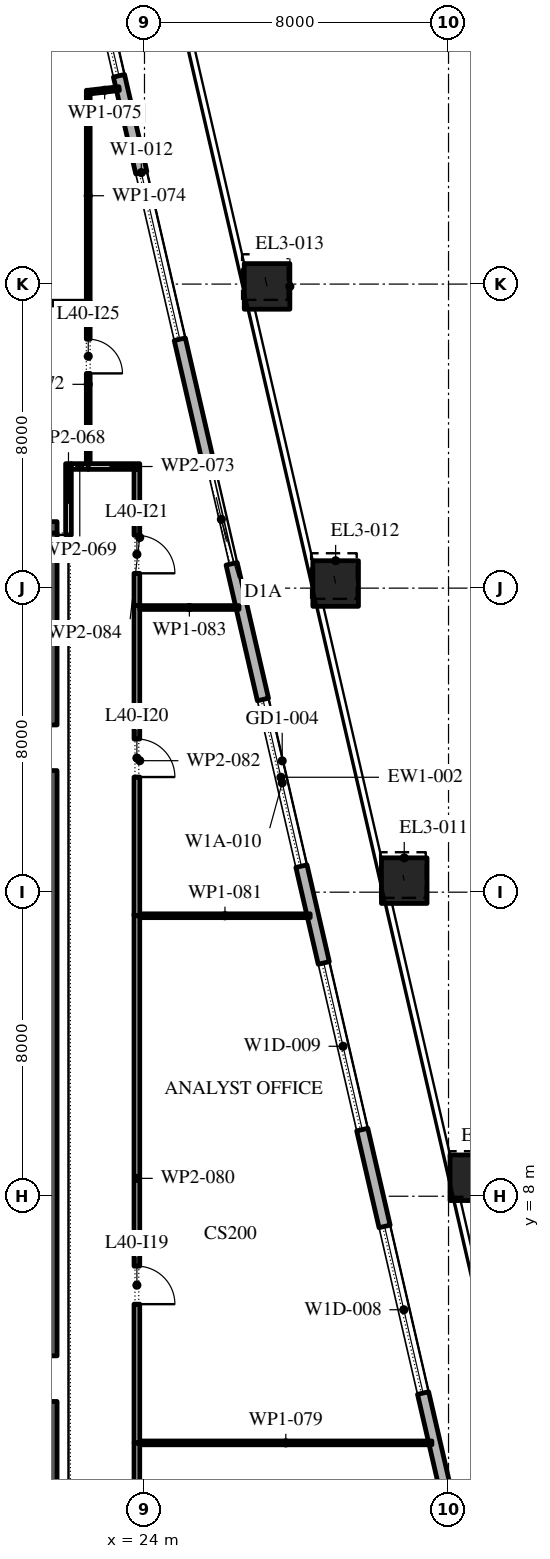
"""IFC4 building model, lengths in metres.
Left out: names, types, materials, properties, quantities, classifications, styles, units other than length and angle.
Written with IfcOpenShell. Run it as: python <this file> out.ifc"""

import sys

from ifc_helpers import new_model, si_unit, direction, frame, frame_2d, origin, origin_2d, place, context, subcontext, project, spatial, rectangle, extrude, element, fill, save


model = new_model("IFC4")
c1 = context("Model", 3, precision=1e-05, world=origin(), true_north=direction((0.0, 1.0)))
c2 = subcontext(c1, "Body", "Model", "MODEL_VIEW")
j1 = project(units=[si_unit("LENGTHUNIT", "METRE"), si_unit("PLANEANGLEUNIT", "RADIAN")], contexts=[c1])
p1 = place(None, origin())
s1 = spatial("IfcSite", under=j1, at=p1, CompositionType="ELEMENT")
p2 = place(p1, origin())
s2 = spatial("IfcBuilding", under=s1, at=p2, CompositionType="ELEMENT")
p3 = place(p2, frame((0.0, 0.0, 184.2)))
s3 = spatial("IfcBuildingStorey", under=s2, at=p3, CompositionType="ELEMENT", Elevation=184.2)
p4 = place(p3, frame((32.639, 8.486, 0.0), z_axis=(-0.005404479485, 0.023361298418, 0.999712479335), x_axis=(-0.974268511785, -0.225390476607, 0.0)))
e1 = element("IfcColumn", 1, at=p4, inside=s3, PredefinedType="COLUMN", context=c2, shape_type="SweptSolid", body=[
    extrude(rectangle(XDim=1.2, YDim=1.2, at=origin_2d()), origin(), (0.0, 0.0, 1.0), 4.201),
])
p5 = place(p3, frame((30.835, 16.304, 0.0), z_axis=(-0.008132851642, 0.035029353857, 0.999353191366), x_axis=(-0.974090845759, -0.226157078617, 0.0)))
e2 = element("IfcColumn", 2, at=p5, inside=s3, PredefinedType="COLUMN", context=c2, shape_type="SweptSolid", body=[
    extrude(rectangle(XDim=1.2, YDim=1.2, at=origin_2d()), origin(), (0.0, 0.0, 1.0), 4.203),
])
p6 = place(p3, frame((29.03, 24.121, 0.0), z_axis=(-0.010799619665, 0.046740289408, 0.998848694028), x_axis=(-0.974329962248, -0.225124686929, 0.0)))
e3 = element("IfcColumn", 3, at=p6, inside=s3, PredefinedType="COLUMN", context=c2, shape_type="SweptSolid", body=[
    extrude(rectangle(XDim=1.2, YDim=1.2, at=origin_2d()), origin(), (0.0, 0.0, 1.0), 4.205),
])
p7 = place(p3, frame((27.225, 31.939, 0.0), z_axis=(-0.013519814281, 0.05837310372, 0.998203283597), x_axis=(-0.974211350104, -0.225637420054, 0.0)))
e4 = element("IfcColumn", 4, at=p7, inside=s3, PredefinedType="COLUMN", context=c2, shape_type="SweptSolid", body=[
    extrude(rectangle(XDim=1.2, YDim=1.2, at=origin_2d()), origin(), (0.0, 0.0, 1.0), 4.208),
])
p8 = place(p3, frame((33.157, -5.092, 0.0), z_axis=(0.0, 0.0, 1.0), x_axis=(-0.224950279389, 0.974370243697, 0.0)))
e5 = element("IfcWall", 5, at=p8, inside=s3, PredefinedType="STANDARD", context=c2, shape_type="SweptSolid", body=[
    extrude(rectangle(XDim=49.5, YDim=0.3, at=frame_2d((24.75, 0.0))), origin(), (0.0, 0.0, 1.0), 4.0),
])
p9 = place(p8, frame((2.207, 0.0, 0.0)))
e6 = element("IfcOpeningElement", 6, at=p9, cuts=e5, PredefinedType="OPENING", context=c2, shape_type="SweptSolid", body=[
    extrude(rectangle(XDim=2.4, YDim=3.125, at=frame_2d((1.2, 1.562))), frame((0.0, 0.16, 0.0), z_axis=(0.0, -1.0, 0.0), x_axis=(1.0, 0.0, 0.0)), (0.0, 0.0, 1.0), 0.32),
])
p10 = place(p8, frame((8.121, 0.0, 0.45)))
e7 = element("IfcOpeningElement", 7, at=p10, cuts=e5, PredefinedType="OPENING", context=c2, shape_type="SweptSolid", body=[
    extrude(rectangle(XDim=4.5, YDim=2.875, at=frame_2d((2.25, 1.438))), frame((0.0, 0.16, 0.0), z_axis=(0.0, -1.0, 0.0), x_axis=(1.0, 0.0, 0.0)), (0.0, 0.0, 1.0), 0.32),
])
p11 = place(p8, frame((15.236, 0.0, 0.45)))
e8 = element("IfcOpeningElement", 8, at=p11, cuts=e5, PredefinedType="OPENING", context=c2, shape_type="SweptSolid", body=[
    extrude(rectangle(XDim=4.5, YDim=2.875, at=frame_2d((2.25, 1.438))), frame((0.0, 0.16, 0.0), z_axis=(0.0, -1.0, 0.0), x_axis=(1.0, 0.0, 0.0)), (0.0, 0.0, 1.0), 0.32),
])
p12 = place(p8, frame((22.35, 0.0, 0.45)))
e9 = element("IfcOpeningElement", 9, at=p12, cuts=e5, PredefinedType="OPENING", context=c2, shape_type="SweptSolid", body=[
    extrude(rectangle(XDim=4.5, YDim=3.0, at=frame_2d((2.25, 1.5))), frame((0.0, 0.16, 0.0), z_axis=(0.0, -1.0, 0.0), x_axis=(1.0, 0.0, 0.0)), (0.0, 0.0, 1.0), 0.32),
])
p13 = place(p8, frame((30.514, 0.0, 0.0)))
e10 = element("IfcOpeningElement", 10, at=p13, cuts=e5, PredefinedType="OPENING", context=c2, shape_type="SweptSolid", body=[
    extrude(rectangle(XDim=2.4, YDim=3.45, at=frame_2d((1.2, 1.725))), frame((0.0, 0.16, 0.0), z_axis=(0.0, -1.0, 0.0), x_axis=(1.0, 0.0, 0.0)), (0.0, 0.0, 1.0), 0.32),
])
p14 = place(p8, frame((36.579, 0.0, 0.45)))
e11 = element("IfcOpeningElement", 11, at=p14, cuts=e5, PredefinedType="OPENING", context=c2, shape_type="SweptSolid", body=[
    extrude(rectangle(XDim=4.5, YDim=3.05, at=frame_2d((2.25, 1.525))), frame((0.0, 0.16, 0.0), z_axis=(0.0, -1.0, 0.0), x_axis=(1.0, 0.0, 0.0)), (0.0, 0.0, 1.0), 0.32),
])
p15 = place(p8, frame((43.693, 0.0, 0.45)))
e12 = element("IfcOpeningElement", 12, at=p15, cuts=e5, PredefinedType="OPENING", context=c2, shape_type="SweptSolid", body=[
    extrude(rectangle(XDim=4.5, YDim=3.05, at=frame_2d((2.25, 1.525))), frame((0.0, 0.16, 0.0), z_axis=(0.0, -1.0, 0.0), x_axis=(1.0, 0.0, 0.0)), (0.0, 0.0, 1.0), 0.32),
])
p16 = place(p3, frame((21.35, -2.45, 0.0), z_axis=(0.0, 0.0, 1.0), x_axis=(0.0, 1.0, 0.0)))
e13 = element("IfcWall", 13, at=p16, inside=s3, PredefinedType="SHEAR", context=c2, shape_type="SweptSolid", body=[
    extrude(rectangle(XDim=27.9, YDim=0.7, at=frame_2d((13.95, 0.0))), origin(), (0.0, 0.0, 1.0), 4.0),
])
p17 = place(p16, frame((5.05, 0.0, 0.0)))
e14 = element("IfcOpeningElement", 14, at=p17, cuts=e13, PredefinedType="OPENING", context=c2, shape_type="SweptSolid", body=[
    extrude(rectangle(XDim=1.2, YDim=2.1, at=frame_2d((0.6, 1.05))), frame((0.0, 0.36, 0.0), z_axis=(0.0, -1.0, 0.0), x_axis=(1.0, 0.0, 0.0)), (0.0, 0.0, 1.0), 0.72),
])
p18 = place(p16, frame((21.65, 0.0, 0.0)))
e15 = element("IfcOpeningElement", 15, at=p18, cuts=e13, PredefinedType="OPENING", context=c2, shape_type="SweptSolid", body=[
    extrude(rectangle(XDim=1.2, YDim=2.1, at=frame_2d((0.6, 1.05))), frame((0.0, 0.36, 0.0), z_axis=(0.0, -1.0, 0.0), x_axis=(1.0, 0.0, 0.0)), (0.0, 0.0, 1.0), 0.72),
])
p19 = place(p3, frame((10.3, 25.6, 0.0), z_axis=(0.0, 0.0, 1.0), x_axis=(1.0, 0.0, 0.0)))
e16 = element("IfcWall", 16, at=p19, inside=s3, PredefinedType="SHEAR", context=c2, shape_type="SweptSolid", body=[
    extrude(rectangle(XDim=11.4, YDim=0.3, at=frame_2d((5.7, 0.0))), origin(), (0.0, 0.0, 1.0), 4.0),
])
p20 = place(p3, frame((14.43, 31.5, 0.0), z_axis=(0.0, 0.0, 1.0), x_axis=(1.0, 0.0, 0.0)))
e17 = element("IfcWall", 17, at=p20, inside=s3, PredefinedType="PARTITIONING", context=c2, shape_type="SweptSolid", body=[
    extrude(rectangle(XDim=8.14, YDim=0.1, at=frame_2d((4.07, 0.0))), origin(), (0.0, 0.0, 1.0), 4.0),
])
p21 = place(p3, frame((22.0, 25.4, 0.0), z_axis=(0.0, 0.0, 1.0), x_axis=(0.0, 1.0, 0.0)))
e18 = element("IfcWall", 18, at=p21, inside=s3, PredefinedType="PARTITIONING", context=c2, shape_type="SweptSolid", body=[
    extrude(rectangle(XDim=1.875, YDim=0.15, at=frame_2d((0.938, 0.0))), origin(), (0.0, 0.0, 1.0), 4.0),
])
p22 = place(p3, frame((22.075, 27.2, 0.0), z_axis=(0.0, 0.0, 1.0), x_axis=(1.0, 0.0, 0.0)))
e19 = element("IfcWall", 19, at=p22, inside=s3, PredefinedType="PARTITIONING", context=c2, shape_type="SweptSolid", body=[
    extrude(rectangle(XDim=0.445, YDim=0.15, at=frame_2d((0.223, 0.0))), origin(), (0.0, 0.0, 1.0), 4.0),
])
p23 = place(p3, frame((22.52, 27.275, 0.0), z_axis=(0.0, 0.0, 1.0), x_axis=(0.0, 1.0, 0.0)))
e20 = element("IfcWall", 20, at=p23, inside=s3, PredefinedType="PARTITIONING", context=c2, shape_type="SweptSolid", body=[
    extrude(rectangle(XDim=4.175, YDim=0.1, at=frame_2d((2.087, 0.0))), origin(), (0.0, 0.0, 1.0), 4.0),
])
p24 = place(p23, frame((2.375, 0.0, 0.0)))
e21 = element("IfcOpeningElement", 21, at=p24, cuts=e20, PredefinedType="OPENING", context=c2, shape_type="SweptSolid", body=[
    extrude(rectangle(XDim=0.9, YDim=2.1, at=frame_2d((0.45, 1.05))), frame((0.0, 0.06, 0.0), z_axis=(0.0, -1.0, 0.0), x_axis=(1.0, 0.0, 0.0)), (0.0, 0.0, 1.0), 0.12),
])
p25 = place(p3, frame((22.52, 27.2, 0.0), z_axis=(0.0, 0.0, 1.0), x_axis=(1.0, 0.0, 0.0)))
e22 = element("IfcWall", 22, at=p25, inside=s3, PredefinedType="PARTITIONING", context=c2, shape_type="SweptSolid", body=[
    extrude(rectangle(XDim=1.355, YDim=0.15, at=frame_2d((0.677, 0.0))), origin(), (0.0, 0.0, 1.0), 4.0),
])
p26 = place(p3, frame((22.52, 31.55, 0.0), z_axis=(0.0, 0.0, 1.0), x_axis=(0.0, 1.0, 0.0)))
e23 = element("IfcWall", 23, at=p26, inside=s3, PredefinedType="PARTITIONING", context=c2, shape_type="SweptSolid", body=[
    extrude(rectangle(XDim=5.55, YDim=0.1, at=frame_2d((2.775, 0.0))), origin(), (0.0, 0.0, 1.0), 4.0),
])
p27 = place(p3, frame((22.57, 37.056, 0.0), z_axis=(0.0, 0.0, 1.0), x_axis=(0.993410326243, 0.114612057454, 0.0)))
e24 = element("IfcWall", 24, at=p27, inside=s3, PredefinedType="PARTITIONING", context=c2, shape_type="SweptSolid", body=[
    extrude(rectangle(XDim=0.769, YDim=0.1, at=frame_2d((0.385, 0.0))), origin(), (0.0, 0.0, 1.0), 4.0),
])
p28 = place(p3, frame((23.8, 1.51, 0.0), z_axis=(0.0, 0.0, 1.0), x_axis=(0.0, -1.0, 0.0)))
e25 = element("IfcWall", 25, at=p28, inside=s3, PredefinedType="PARTITIONING", context=c2, shape_type="SweptSolid", body=[
    extrude(rectangle(XDim=6.435, YDim=0.15, at=frame_2d((3.218, 0.0))), origin(), (0.0, 0.0, 1.0), 4.0),
])
p29 = place(p28, frame((2.11, 0.0, 0.0)))
e26 = element("IfcOpeningElement", 26, at=p29, cuts=e25, PredefinedType="OPENING", context=c2, shape_type="SweptSolid", body=[
    extrude(rectangle(XDim=1.0, YDim=2.1, at=frame_2d((0.5, 1.05))), frame((0.0, 0.085, 0.0), z_axis=(0.0, -1.0, 0.0), x_axis=(1.0, 0.0, 0.0)), (0.0, 0.0, 1.0), 0.17),
])
p30 = place(p3, frame((23.875, 1.51, 0.0), z_axis=(0.0, 0.0, 1.0), x_axis=(1.0, 0.0, 0.0)))
e27 = element("IfcWall", 27, at=p30, inside=s3, PredefinedType="PARTITIONING", context=c2, shape_type="SweptSolid", body=[
    extrude(rectangle(XDim=7.687, YDim=0.1, at=frame_2d((3.844, 0.0))), origin(), (0.0, 0.0, 1.0), 4.0),
])
p31 = place(p3, frame((23.8, 15.43, 0.0), z_axis=(0.0, 0.0, 1.0), x_axis=(0.0, -1.0, 0.0)))
e28 = element("IfcWall", 28, at=p31, inside=s3, PredefinedType="PARTITIONING", context=c2, shape_type="SweptSolid", body=[
    extrude(rectangle(XDim=13.92, YDim=0.15, at=frame_2d((6.96, 0.0))), origin(), (0.0, 0.0, 1.0), 4.0),
])
p32 = place(p31, frame((9.27, 0.0, 0.0)))
e29 = element("IfcOpeningElement", 29, at=p32, cuts=e28, PredefinedType="OPENING", context=c2, shape_type="SweptSolid", body=[
    extrude(rectangle(XDim=1.0, YDim=2.1, at=frame_2d((0.5, 1.05))), frame((0.0, 0.085, 0.0), z_axis=(0.0, -1.0, 0.0), x_axis=(1.0, 0.0, 0.0)), (0.0, 0.0, 1.0), 0.17),
])
p33 = place(p3, frame((23.875, 15.38, 0.0), z_axis=(0.0, 0.0, 1.0), x_axis=(1.0, 0.0, 0.0)))
e30 = element("IfcWall", 30, at=p33, inside=s3, PredefinedType="PARTITIONING", context=c2, shape_type="SweptSolid", body=[
    extrude(rectangle(XDim=4.485, YDim=0.1, at=frame_2d((2.243, 0.0))), origin(), (0.0, 0.0, 1.0), 4.0),
])
p34 = place(p3, frame((23.8, 23.54, 0.0), z_axis=(0.0, 0.0, 1.0), x_axis=(0.0, -1.0, 0.0)))
e31 = element("IfcWall", 31, at=p34, inside=s3, PredefinedType="PARTITIONING", context=c2, shape_type="SweptSolid", body=[
    extrude(rectangle(XDim=8.16, YDim=0.15, at=frame_2d((4.08, 0.0))), origin(), (0.0, 0.0, 1.0), 4.0),
])
p35 = place(p34, frame((3.51, 0.0, 0.0)))
e32 = element("IfcOpeningElement", 32, at=p35, cuts=e31, PredefinedType="OPENING", context=c2, shape_type="SweptSolid", body=[
    extrude(rectangle(XDim=1.0, YDim=2.1, at=frame_2d((0.5, 1.05))), frame((0.0, 0.085, 0.0), z_axis=(0.0, -1.0, 0.0), x_axis=(1.0, 0.0, 0.0)), (0.0, 0.0, 1.0), 0.17),
])
p36 = place(p3, frame((23.875, 23.49, 0.0), z_axis=(0.0, 0.0, 1.0), x_axis=(1.0, 0.0, 0.0)))
e33 = element("IfcWall", 33, at=p36, inside=s3, PredefinedType="PARTITIONING", context=c2, shape_type="SweptSolid", body=[
    extrude(rectangle(XDim=2.612, YDim=0.1, at=frame_2d((1.306, 0.0))), origin(), (0.0, 0.0, 1.0), 4.0),
])
p37 = place(p3, frame((23.8, 27.125, 0.0), z_axis=(0.0, 0.0, 1.0), x_axis=(0.0, -1.0, 0.0)))
e34 = element("IfcWall", 34, at=p37, inside=s3, PredefinedType="PARTITIONING", context=c2, shape_type="SweptSolid", body=[
    extrude(rectangle(XDim=3.585, YDim=0.15, at=frame_2d((1.792, 0.0))), origin(), (0.0, 0.0, 1.0), 4.0),
])
p38 = place(p37, frame((1.735, 0.0, 0.0)))
e35 = element("IfcOpeningElement", 35, at=p38, cuts=e34, PredefinedType="OPENING", context=c2, shape_type="SweptSolid", body=[
    extrude(rectangle(XDim=1.0, YDim=2.1, at=frame_2d((0.5, 1.05))), frame((0.0, 0.085, 0.0), z_axis=(0.0, -1.0, 0.0), x_axis=(1.0, 0.0, 0.0)), (0.0, 0.0, 1.0), 0.17),
])
p39 = place(p10, origin())
e36 = element("IfcWindow", 36, at=p39, inside=s3, PartitioningType="DOUBLE_PANEL_VERTICAL", PredefinedType="WINDOW", context=c2, shape_type="SweptSolid", body=[
    extrude(rectangle(XDim=4.5, YDim=2.875, at=frame_2d((2.25, 1.438))), frame((0.0, 0.03, 0.0), z_axis=(0.0, -1.0, 0.0), x_axis=(1.0, 0.0, 0.0)), (0.0, 0.0, 1.0), 0.06),
])
fill(e7, e36)
p40 = place(p11, origin())
e37 = element("IfcWindow", 37, at=p40, inside=s3, PartitioningType="DOUBLE_PANEL_VERTICAL", PredefinedType="WINDOW", context=c2, shape_type="SweptSolid", body=[
    extrude(rectangle(XDim=4.5, YDim=2.875, at=frame_2d((2.25, 1.438))), frame((0.0, 0.03, 0.0), z_axis=(0.0, -1.0, 0.0), x_axis=(1.0, 0.0, 0.0)), (0.0, 0.0, 1.0), 0.06),
])
fill(e8, e37)
p41 = place(p12, origin())
e38 = element("IfcWindow", 38, at=p41, inside=s3, PartitioningType="DOUBLE_PANEL_VERTICAL", PredefinedType="WINDOW", context=c2, shape_type="SweptSolid", body=[
    extrude(rectangle(XDim=4.5, YDim=3.0, at=frame_2d((2.25, 1.5))), frame((0.0, 0.03, 0.0), z_axis=(0.0, -1.0, 0.0), x_axis=(1.0, 0.0, 0.0)), (0.0, 0.0, 1.0), 0.06),
])
fill(e9, e38)
p42 = place(p13, origin())
e39 = element("IfcDoor", 39, at=p42, inside=s3, OperationType="DOUBLE_DOOR_SLIDING", PredefinedType="DOOR", context=c2, shape_type="SweptSolid", body=[
    extrude(rectangle(XDim=2.4, YDim=3.45, at=frame_2d((1.2, 1.725))), frame((0.0, 0.025, 0.0), z_axis=(0.0, -1.0, 0.0), x_axis=(1.0, 0.0, 0.0)), (0.0, 0.0, 1.0), 0.05),
])
fill(e10, e39)
p43 = place(p14, origin())
e40 = element("IfcWindow", 40, at=p43, inside=s3, PartitioningType="DOUBLE_PANEL_VERTICAL", PredefinedType="WINDOW", context=c2, shape_type="SweptSolid", body=[
    extrude(rectangle(XDim=4.5, YDim=3.05, at=frame_2d((2.25, 1.525))), frame((0.0, 0.03, 0.0), z_axis=(0.0, -1.0, 0.0), x_axis=(1.0, 0.0, 0.0)), (0.0, 0.0, 1.0), 0.06),
])
fill(e11, e40)
p44 = place(p15, origin())
e41 = element("IfcWindow", 41, at=p44, inside=s3, PartitioningType="DOUBLE_PANEL_VERTICAL", PredefinedType="WINDOW", context=c2, shape_type="SweptSolid", body=[
    extrude(rectangle(XDim=4.5, YDim=3.05, at=frame_2d((2.25, 1.525))), frame((0.0, 0.03, 0.0), z_axis=(0.0, -1.0, 0.0), x_axis=(1.0, 0.0, 0.0)), (0.0, 0.0, 1.0), 0.06),
])
fill(e12, e41)
p45 = place(p32, origin())
e42 = element("IfcDoor", 42, at=p45, inside=s3, OperationType="SINGLE_SWING_LEFT", PredefinedType="DOOR", context=c2, shape_type="SweptSolid", body=[
    extrude(rectangle(XDim=1.0, YDim=2.1, at=frame_2d((0.5, 1.05))), frame((0.0, 0.025, 0.0), z_axis=(0.0, -1.0, 0.0), x_axis=(1.0, 0.0, 0.0)), (0.0, 0.0, 1.0), 0.05),
])
fill(e29, e42)
p46 = place(p35, origin())
e43 = element("IfcDoor", 43, at=p46, inside=s3, OperationType="SINGLE_SWING_LEFT", PredefinedType="DOOR", context=c2, shape_type="SweptSolid", body=[
    extrude(rectangle(XDim=1.0, YDim=2.1, at=frame_2d((0.5, 1.05))), frame((0.0, 0.025, 0.0), z_axis=(0.0, -1.0, 0.0), x_axis=(1.0, 0.0, 0.0)), (0.0, 0.0, 1.0), 0.05),
])
fill(e32, e43)
p47 = place(p38, origin())
e44 = element("IfcDoor", 44, at=p47, inside=s3, OperationType="SINGLE_SWING_LEFT", PredefinedType="DOOR", context=c2, shape_type="SweptSolid", body=[
    extrude(rectangle(XDim=1.0, YDim=2.1, at=frame_2d((0.5, 1.05))), frame((0.0, 0.025, 0.0), z_axis=(0.0, -1.0, 0.0), x_axis=(1.0, 0.0, 0.0)), (0.0, 0.0, 1.0), 0.05),
])
fill(e35, e44)
p48 = place(p24, frame((0.9, 0.0, 0.0), z_axis=(0.0, 0.0, 1.0), x_axis=(-1.0, 0.0, 0.0)))
e45 = element("IfcDoor", 45, at=p48, inside=s3, OperationType="SINGLE_SWING_LEFT", PredefinedType="DOOR", context=c2, shape_type="SweptSolid", body=[
    extrude(rectangle(XDim=0.9, YDim=2.1, at=frame_2d((0.45, 1.05))), frame((0.0, 0.025, 0.0), z_axis=(0.0, -1.0, 0.0), x_axis=(1.0, 0.0, 0.0)), (0.0, 0.0, 1.0), 0.05),
])
fill(e21, e45)
save(model, sys.argv[1])
